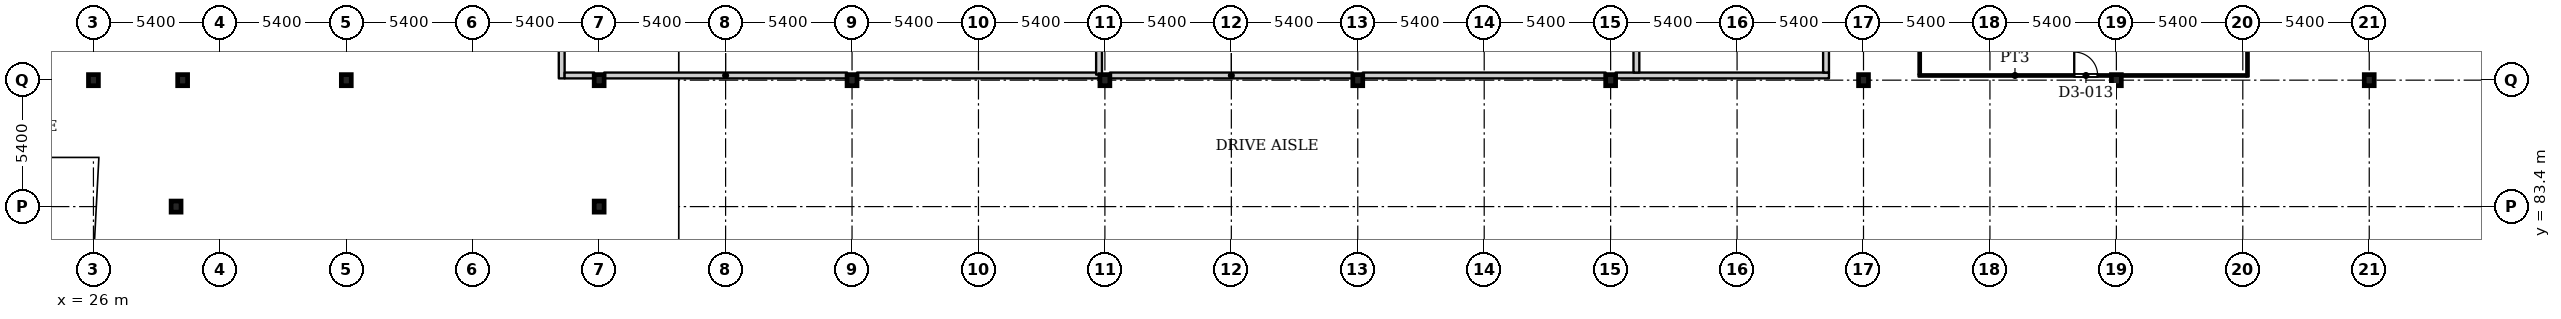
"""IFC4 building model, lengths in metres.
Left out: names, types, materials, properties, quantities, classifications, styles, units other than length and angle.
Written with IfcOpenShell. Run it as: python <this file> out.ifc"""

import sys

from ifc_helpers import new_model, si_unit, direction, frame, frame_2d, origin, origin_2d, place, context, subcontext, project, spatial, rectangle, i_section, extrude, source, transform, mapped, element, fill, save


model = new_model("IFC4")
c1 = context("Model", 3, precision=1e-05, world=origin(), true_north=direction((0.0, 1.0)))
c2 = subcontext(c1, "Body", "Model", "MODEL_VIEW")
j1 = project(units=[si_unit("LENGTHUNIT", "METRE"), si_unit("PLANEANGLEUNIT", "RADIAN")], contexts=[c1])
p1 = place(None, origin())
s1 = spatial("IfcSite", under=j1, at=p1, CompositionType="ELEMENT")
p2 = place(p1, origin())
s2 = spatial("IfcBuilding", under=s1, at=p2, CompositionType="ELEMENT")
p3 = place(p2, frame((0.0, 0.0, -15.0)))
s3 = spatial("IfcBuildingStorey", under=s2, at=p3, CompositionType="ELEMENT", Elevation=-15.0)
for number, where, z_axis, x_axis in (
    (1, (26.0, 88.8, 0.0), (0.0, 0.0, 1.0), (1.0, 0.0, 0.0)),
    (2, (36.8, 88.8, 0.0), (0.0, 0.0, 1.0), (1.0, 0.0, 0.0)),
    (3, (47.6, 88.8, 0.0), (0.0, 0.0, 1.0), (1.0, 0.0, 0.0)),
    (4, (58.4, 88.8, 0.0), (0.0, 0.0, 1.0), (1.0, 0.0, 0.0)),
    (5, (69.2, 88.8, 0.0), (0.0, 0.0, 1.0), (1.0, 0.0, 0.0)),
    (6, (80.0, 88.8, 0.0), (0.0, 0.0, 1.0), (1.0, 0.0, 0.0)),
    (7, (90.8, 88.8, 0.0), (0.0, 0.0, 1.0), (1.0, 0.0, 0.0)),
    (8, (101.6, 88.8, 0.0), (0.0, 0.0, 1.0), (1.0, 0.0, 0.0)),
    (9, (112.4, 88.8, 0.0), (0.0, 0.0, 1.0), (1.0, 0.0, 0.0)),
    (10, (123.2, 88.8, 0.0), (0.0, 0.0, 1.0), (1.0, 0.0, 0.0)),
    (11, (29.53, 83.4, 0.0), (0.0, 0.0, 1.0), (1.0, 0.0, 0.0)),
    (12, (47.6, 83.4, 0.0), (0.0, 0.0, 1.0), (1.0, 0.0, 0.0)),
    (13, (29.81, 88.8, 0.0), (0.0, 0.0, 1.0), (1.0, 0.0, 0.0)),
):
    element("IfcColumn", number, at=place(p3, frame(where, z_axis=z_axis, x_axis=x_axis)), inside=s3, PredefinedType="COLUMN", context=c2, shape_type="SweptSolid", body=[
        extrude(i_section(OverallWidth=0.424, OverallDepth=0.474, WebThickness=0.048, FlangeThickness=0.077, FilletRadius=0.014, at=origin_2d()), origin(), (0.0, 0.0, 1.0), 5.0),
    ])
p4 = place(p3, frame((46.0, 88.875, 0.0), z_axis=(0.0, 0.0, 1.0), x_axis=(0.0, 1.0, 0.0)))
e14 = element("IfcWall", 14, at=p4, inside=s3, PredefinedType="PARTITIONING", context=c2, shape_type="SweptSolid", body=[
    extrude(rectangle(XDim=7.8, YDim=0.25, at=frame_2d((3.9, 0.0))), origin(), (0.0, 0.0, 1.0), 4.68),
])
p5 = place(p3, frame((46.125, 89.0, 0.0), z_axis=(0.0, 0.0, 1.0), x_axis=(1.0, 0.0, 0.0)))
e15 = element("IfcWall", 15, at=p5, inside=s3, PredefinedType="PARTITIONING", context=c2, shape_type="SweptSolid", body=[
    extrude(rectangle(XDim=1.264, YDim=0.25, at=frame_2d((0.632, 0.0))), origin(), (0.0, 0.0, 1.0), 4.68),
])
p6 = place(p3, frame((47.811, 89.0, 0.0), z_axis=(0.0, 0.0, 1.0), x_axis=(1.0, 0.0, 0.0)))
e16 = element("IfcWall", 16, at=p6, inside=s3, PredefinedType="PARTITIONING", context=c2, shape_type="SweptSolid", body=[
    extrude(rectangle(XDim=10.378, YDim=0.25, at=frame_2d((5.189, 0.0))), origin(), (0.0, 0.0, 1.0), 4.68),
])
p7 = place(p3, frame((58.611, 89.0, 0.0), z_axis=(0.0, 0.0, 1.0), x_axis=(1.0, 0.0, 0.0)))
e17 = element("IfcWall", 17, at=p7, inside=s3, PredefinedType="PARTITIONING", context=c2, shape_type="SweptSolid", body=[
    extrude(rectangle(XDim=10.339, YDim=0.25, at=frame_2d((5.169, 0.0))), origin(), (0.0, 0.0, 1.0), 4.68),
])
p8 = place(p3, frame((68.95, 89.036, 0.0), z_axis=(0.0, 0.0, 1.0), x_axis=(0.0, 1.0, 0.0)))
e18 = element("IfcWall", 18, at=p8, inside=s3, PredefinedType="PARTITIONING", context=c2, shape_type="SweptSolid", body=[
    extrude(rectangle(XDim=7.639, YDim=0.25, at=frame_2d((3.82, 0.0))), origin(), (0.0, 0.0, 1.0), 4.68),
])
for number, where, z_axis, x_axis in (
    (19, (69.411, 89.0, 0.0), (0.0, 0.0, 1.0), (1.0, 0.0, 0.0)),
    (20, (80.211, 89.0, 0.0), (0.0, 0.0, 1.0), (1.0, 0.0, 0.0)),
):
    element("IfcWall", number, at=place(p3, frame(where, z_axis=z_axis, x_axis=x_axis)), inside=s3, PredefinedType="PARTITIONING", context=c2, shape_type="SweptSolid", body=[
        extrude(rectangle(XDim=10.378, YDim=0.25, at=frame_2d((5.189, 0.0))), origin(), (0.0, 0.0, 1.0), 4.68),
    ])
p9 = place(p3, frame((91.011, 89.0, 0.0), z_axis=(0.0, 0.0, 1.0), x_axis=(1.0, 0.0, 0.0)))
e21 = element("IfcWall", 21, at=p9, inside=s3, PredefinedType="PARTITIONING", context=c2, shape_type="SweptSolid", body=[
    extrude(rectangle(XDim=9.114, YDim=0.25, at=frame_2d((4.557, 0.0))), origin(), (0.0, 0.0, 1.0), 4.68),
])
p10 = place(p3, frame((91.9, 89.125, 0.0), z_axis=(0.0, 0.0, 1.0), x_axis=(0.0, 1.0, 0.0)))
e22 = element("IfcWall", 22, at=p10, inside=s3, PredefinedType="PARTITIONING", context=c2, shape_type="SweptSolid", body=[
    extrude(rectangle(XDim=7.55, YDim=0.25, at=frame_2d((3.775, 0.0))), origin(), (0.0, 0.0, 1.0), 4.68),
])
p11 = place(p3, frame((100.0, 89.125, 0.0), z_axis=(0.0, 0.0, 1.0), x_axis=(0.0, 1.0, 0.0)))
e23 = element("IfcWall", 23, at=p11, inside=s3, PredefinedType="PARTITIONING", context=c2, shape_type="SweptSolid", body=[
    extrude(rectangle(XDim=7.675, YDim=0.25, at=frame_2d((3.837, 0.0))), origin(), (0.0, 0.0, 1.0), 4.68),
])
p12 = place(p3, frame((103.95, 89.0, 0.0), z_axis=(0.0, 0.0, 1.0), x_axis=(1.0, 0.0, 0.0)))
e24 = element("IfcWall", 24, at=p12, inside=s3, PredefinedType="PARTITIONING", context=c2, shape_type="SweptSolid", body=[
    extrude(rectangle(XDim=8.239, YDim=0.1, at=frame_2d((4.12, 0.0))), origin(), (0.0, 0.0, 1.0), 4.68),
])
p13 = place(p12, frame((6.65, 0.0, 0.0)))
e25 = element("IfcOpeningElement", 25, at=p13, cuts=e24, PredefinedType="OPENING", context=c2, shape_type="SweptSolid", body=[
    extrude(rectangle(XDim=1.0, YDim=2.1, at=frame_2d((0.5, 1.05))), frame((0.0, 0.06, 0.0), z_axis=(0.0, -1.0, 0.0), x_axis=(1.0, 0.0, 0.0)), (0.0, 0.0, 1.0), 0.12),
])
p14 = place(p3, frame((104.0, 89.05, 0.0), z_axis=(0.0, 0.0, 1.0), x_axis=(0.0, 1.0, 0.0)))
e26 = element("IfcWall", 26, at=p14, inside=s3, PredefinedType="PARTITIONING", context=c2, shape_type="SweptSolid", body=[
    extrude(rectangle(XDim=6.9, YDim=0.1, at=frame_2d((3.45, 0.0))), origin(), (0.0, 0.0, 1.0), 4.68),
])
p15 = place(p3, frame((112.611, 89.0, 0.0), z_axis=(0.0, 0.0, 1.0), x_axis=(1.0, 0.0, 0.0)))
e27 = element("IfcWall", 27, at=p15, inside=s3, PredefinedType="PARTITIONING", context=c2, shape_type="SweptSolid", body=[
    extrude(rectangle(XDim=5.339, YDim=0.1, at=frame_2d((2.669, 0.0))), origin(), (0.0, 0.0, 1.0), 4.68),
])
p16 = place(p3, frame((118.0, 88.95, 0.0), z_axis=(0.0, 0.0, 1.0), x_axis=(0.0, 1.0, 0.0)))
e28 = element("IfcWall", 28, at=p16, inside=s3, PredefinedType="PARTITIONING", context=c2, shape_type="SweptSolid", body=[
    extrude(rectangle(XDim=7.0, YDim=0.1, at=frame_2d((3.5, 0.0))), origin(), (0.0, 0.0, 1.0), 4.68),
])
m1 = source(origin(), c2, "Body", "SweptSolid", [
    extrude(rectangle(XDim=1.0, YDim=2.1, at=frame_2d((0.5, 1.05))), frame((0.0, 0.025, 0.0), z_axis=(0.0, -1.0, 0.0), x_axis=(1.0, 0.0, 0.0)), (0.0, 0.0, 1.0), 0.05),
])
p17 = place(p13, origin())
e29 = element("IfcDoor", 29, at=p17, inside=s3, OperationType="SINGLE_SWING_LEFT", PredefinedType="DOOR", context=c2, shape_type="MappedRepresentation", body=[
    mapped(m1, transform((0.0, 0.0, 0.0), x_axis=(1.0, 0.0, 0.0), y_axis=(0.0, 1.0, 0.0), z_axis=(0.0, 0.0, 1.0), scale=1.0)),
])
fill(e25, e29)
save(model, sys.argv[1])
